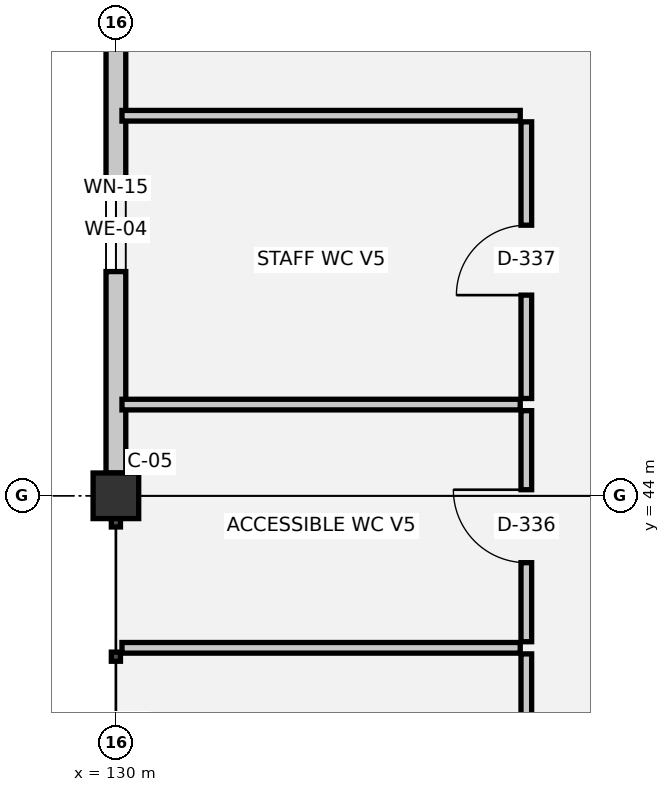
"""IFC4 building model, lengths in metres.
Left out: names, types, materials, properties, quantities, classifications, styles, units other than length and angle.
Written with IfcOpenShell. Run it as: python <this file> out.ifc"""

import sys

from ifc_helpers import new_model, si_unit, direction, frame, frame_2d, origin, origin_2d, place, context, subcontext, project, spatial, rectangle, extrude, element, fill, save


model = new_model("IFC4")
c1 = context("Model", 3, precision=1e-05, world=origin(), true_north=direction((0.0, 1.0)))
c2 = subcontext(c1, "Body", "Model", "MODEL_VIEW")
j1 = project(units=[si_unit("LENGTHUNIT", "METRE"), si_unit("PLANEANGLEUNIT", "RADIAN")], contexts=[c1])
p1 = place(None, origin())
s1 = spatial("IfcSite", under=j1, at=p1, CompositionType="ELEMENT")
p2 = place(p1, origin())
s2 = spatial("IfcBuilding", under=s1, at=p2, CompositionType="ELEMENT")
p3 = place(p2, frame((0.0, 0.0, 18.3)))
s3 = spatial("IfcBuildingStorey", under=s2, at=p3, CompositionType="ELEMENT", Elevation=18.3)
p4 = place(p3, frame((130.0, 44.0, 0.0), z_axis=(0.0, 0.0, 1.0), x_axis=(1.0, 0.0, 0.0)))
e1 = element("IfcColumn", 1, at=p4, inside=s3, PredefinedType="COLUMN", context=c2, shape_type="SweptSolid", body=[
    extrude(rectangle(XDim=0.6, YDim=0.6, at=origin_2d()), origin(), (0.0, 0.0, 1.0), 3.75),
])
p5 = place(p3, frame((130.0, 44.3, 0.0), z_axis=(0.0, 0.0, 1.0), x_axis=(0.0, 1.0, 0.0)))
e2 = element("IfcWall", 2, at=p5, inside=s3, PredefinedType="SOLIDWALL", context=c2, shape_type="SweptSolid", body=[
    extrude(rectangle(XDim=6.4, YDim=0.26, at=frame_2d((3.2, 0.0))), origin(), (0.0, 0.0, 1.0), 2.55),
])
p6 = place(p5, frame((2.65, 0.0, 0.9)))
e3 = element("IfcOpeningElement", 3, at=p6, cuts=e2, PredefinedType="OPENING", context=c2, shape_type="SweptSolid", body=[
    extrude(rectangle(XDim=1.1, YDim=1.2, at=frame_2d((0.55, 0.6))), frame((0.0, 0.14, 0.0), z_axis=(0.0, -1.0, 0.0), x_axis=(1.0, 0.0, 0.0)), (0.0, 0.0, 1.0), 0.28),
])
for number, where, z_axis, x_axis in (
    (4, (130.08, 42.0, 0.0), (0.0, 0.0, 1.0), (1.0, 0.0, 0.0)),
    (5, (130.08, 45.2, 0.0), (0.0, 0.0, 1.0), (1.0, 0.0, 0.0)),
    (6, (130.08, 49.0, 0.0), (0.0, 0.0, 1.0), (1.0, 0.0, 0.0)),
):
    element("IfcWall", number, at=place(p3, frame(where, z_axis=z_axis, x_axis=x_axis)), inside=s3, PredefinedType="PLUMBINGWALL", context=c2, shape_type="SweptSolid", body=[
        extrude(rectangle(XDim=5.24, YDim=0.14, at=frame_2d((2.62, 0.0))), origin(), (0.0, 0.0, 1.0), 3.39),
    ])
p7 = place(p3, frame((135.4, 38.08, 0.0), z_axis=(0.0, 0.0, 1.0), x_axis=(0.0, 1.0, 0.0)))
e7 = element("IfcWall", 7, at=p7, inside=s3, PredefinedType="PLUMBINGWALL", context=c2, shape_type="SweptSolid", body=[
    extrude(rectangle(XDim=3.84, YDim=0.14, at=frame_2d((1.92, 0.0))), origin(), (0.0, 0.0, 1.0), 3.39),
])
p8 = place(p7, frame((1.46, 0.0, 0.0)))
e8 = element("IfcOpeningElement", 8, at=p8, cuts=e7, PredefinedType="OPENING", context=c2, shape_type="SweptSolid", body=[
    extrude(rectangle(XDim=0.92, YDim=2.1, at=frame_2d((0.46, 1.05))), frame((0.0, 0.08, 0.0), z_axis=(0.0, -1.0, 0.0), x_axis=(1.0, 0.0, 0.0)), (0.0, 0.0, 1.0), 0.16),
])
p9 = place(p3, frame((135.4, 42.08, 0.0), z_axis=(0.0, 0.0, 1.0), x_axis=(0.0, 1.0, 0.0)))
e9 = element("IfcWall", 9, at=p9, inside=s3, PredefinedType="PLUMBINGWALL", context=c2, shape_type="SweptSolid", body=[
    extrude(rectangle(XDim=3.04, YDim=0.14, at=frame_2d((1.52, 0.0))), origin(), (0.0, 0.0, 1.0), 3.39),
])
p10 = place(p9, frame((1.04, 0.0, 0.0)))
e10 = element("IfcOpeningElement", 10, at=p10, cuts=e9, PredefinedType="OPENING", context=c2, shape_type="SweptSolid", body=[
    extrude(rectangle(XDim=0.96, YDim=2.1, at=frame_2d((0.48, 1.05))), frame((0.0, 0.08, 0.0), z_axis=(0.0, -1.0, 0.0), x_axis=(1.0, 0.0, 0.0)), (0.0, 0.0, 1.0), 0.16),
])
p11 = place(p3, frame((135.4, 45.28, 0.0), z_axis=(0.0, 0.0, 1.0), x_axis=(0.0, 1.0, 0.0)))
e11 = element("IfcWall", 11, at=p11, inside=s3, PredefinedType="PLUMBINGWALL", context=c2, shape_type="SweptSolid", body=[
    extrude(rectangle(XDim=3.64, YDim=0.14, at=frame_2d((1.82, 0.0))), origin(), (0.0, 0.0, 1.0), 3.39),
])
p12 = place(p11, frame((1.36, 0.0, 0.0)))
e12 = element("IfcOpeningElement", 12, at=p12, cuts=e11, PredefinedType="OPENING", context=c2, shape_type="SweptSolid", body=[
    extrude(rectangle(XDim=0.92, YDim=2.1, at=frame_2d((0.46, 1.05))), frame((0.0, 0.08, 0.0), z_axis=(0.0, -1.0, 0.0), x_axis=(1.0, 0.0, 0.0)), (0.0, 0.0, 1.0), 0.16),
])
p13 = place(p6, origin())
e13 = element("IfcWindow", 13, at=p13, inside=s3, PartitioningType="SINGLE_PANEL", PredefinedType="WINDOW", context=c2, shape_type="SweptSolid", body=[
    extrude(rectangle(XDim=1.1, YDim=1.2, at=frame_2d((0.55, 0.6))), frame((0.0, 0.03, 0.0), z_axis=(0.0, -1.0, 0.0), x_axis=(1.0, 0.0, 0.0)), (0.0, 0.0, 1.0), 0.06),
])
fill(e3, e13)
p14 = place(p10, origin())
e14 = element("IfcDoor", 14, at=p14, inside=s3, OperationType="SINGLE_SWING_RIGHT", PredefinedType="DOOR", context=c2, shape_type="SweptSolid", body=[
    extrude(rectangle(XDim=0.96, YDim=2.1, at=frame_2d((0.48, 1.05))), frame((0.0, 0.025, 0.0), z_axis=(0.0, -1.0, 0.0), x_axis=(1.0, 0.0, 0.0)), (0.0, 0.0, 1.0), 0.05),
])
fill(e10, e14)
p15 = place(p12, origin())
e15 = element("IfcDoor", 15, at=p15, inside=s3, OperationType="SINGLE_SWING_LEFT", PredefinedType="DOOR", context=c2, shape_type="SweptSolid", body=[
    extrude(rectangle(XDim=0.92, YDim=2.1, at=frame_2d((0.46, 1.05))), frame((0.0, 0.025, 0.0), z_axis=(0.0, -1.0, 0.0), x_axis=(1.0, 0.0, 0.0)), (0.0, 0.0, 1.0), 0.05),
])
fill(e12, e15)
save(model, sys.argv[1])
